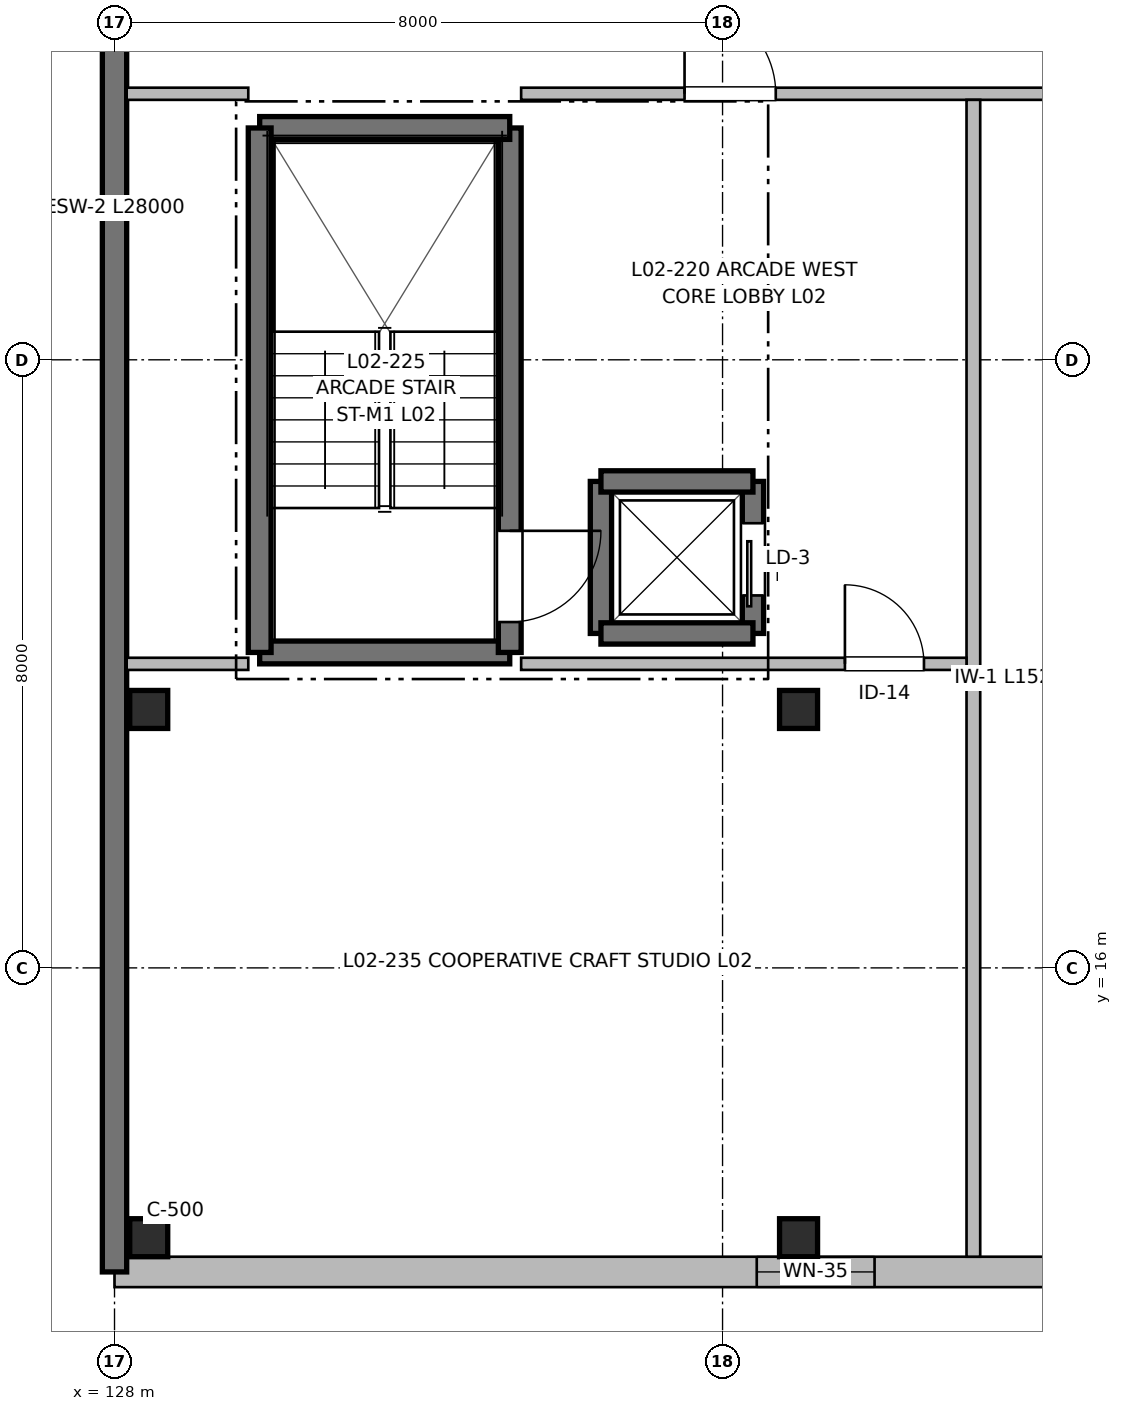
"""IFC4 building model, lengths in metres.
Left out: names, types, materials, properties, quantities, classifications, styles, units other than length and angle.
Written with IfcOpenShell. Run it as: python <this file> out.ifc"""

import sys

from ifc_helpers import new_model, si_unit, direction, frame, frame_2d, origin, origin_2d, place, context, subcontext, project, spatial, rectangle, extrude, element, fill, save


model = new_model("IFC4")
c1 = context("Model", 3, precision=1e-05, world=origin(), true_north=direction((0.0, 1.0)))
c2 = subcontext(c1, "Body", "Model", "MODEL_VIEW")
j1 = project(units=[si_unit("LENGTHUNIT", "METRE"), si_unit("PLANEANGLEUNIT", "RADIAN")], contexts=[c1])
p1 = place(None, origin())
s1 = spatial("IfcSite", under=j1, at=p1, CompositionType="ELEMENT")
p2 = place(p1, origin())
s2 = spatial("IfcBuilding", under=s1, at=p2, CompositionType="ELEMENT")
p3 = place(p2, frame((0.0, 0.0, 7.36)))
s3 = spatial("IfcBuildingStorey", under=s2, at=p3, CompositionType="ELEMENT", Elevation=7.36)
for number, where, z_axis, x_axis in (
    (1, (128.45, 12.45, 0.0), (0.0, 0.0, 1.0), (1.0, 0.0, 0.0)),
    (2, (128.45, 19.4, 0.0), (0.0, 0.0, 1.0), (1.0, 0.0, 0.0)),
    (3, (137.0, 12.45, 0.0), (0.0, 0.0, 1.0), (1.0, 0.0, 0.0)),
    (4, (137.0, 19.4, 0.0), (0.0, 0.0, 1.0), (1.0, 0.0, 0.0)),
):
    element("IfcColumn", number, at=place(p3, frame(where, z_axis=z_axis, x_axis=x_axis)), inside=s3, PredefinedType="COLUMN", context=c2, shape_type="SweptSolid", body=[
        extrude(rectangle(XDim=0.5, YDim=0.5, at=origin_2d()), origin(), (0.0, 0.0, 1.0), 3.2),
    ])
p4 = place(p3, frame((176.0, 12.0, 0.0), z_axis=(0.0, 0.0, 1.0), x_axis=(-1.0, 0.0, 0.0)))
e5 = element("IfcWall", 5, at=p4, inside=s3, PredefinedType="SOLIDWALL", context=c2, shape_type="SweptSolid", body=[
    extrude(rectangle(XDim=48.0, YDim=0.4, at=frame_2d((24.0, 0.0))), origin(), (0.0, 0.0, 1.0), 2.95),
])
p5 = place(p4, frame((5.0, 0.0, 0.62)))
e6 = element("IfcOpeningElement", 6, at=p5, cuts=e5, PredefinedType="OPENING", context=c2, shape_type="SweptSolid", body=[
    extrude(rectangle(XDim=1.75, YDim=1.6, at=frame_2d((0.875, 0.8))), frame((0.0, 0.21, 0.0), z_axis=(0.0, -1.0, 0.0), x_axis=(1.0, 0.0, 0.0)), (0.0, 0.0, 1.0), 0.42),
])
p6 = place(p4, frame((15.45, 0.0, 1.52)))
e7 = element("IfcOpeningElement", 7, at=p6, cuts=e5, PredefinedType="OPENING", context=c2, shape_type="SweptSolid", body=[
    extrude(rectangle(XDim=0.8, YDim=0.7, at=frame_2d((0.4, 0.35))), frame((0.0, 0.21, 0.0), z_axis=(0.0, -1.0, 0.0), x_axis=(1.0, 0.0, 0.0)), (0.0, 0.0, 1.0), 0.42),
])
p7 = place(p4, frame((27.0, 0.0, 1.52)))
e8 = element("IfcOpeningElement", 8, at=p7, cuts=e5, PredefinedType="OPENING", context=c2, shape_type="SweptSolid", body=[
    extrude(rectangle(XDim=0.8, YDim=0.7, at=frame_2d((0.4, 0.35))), frame((0.0, 0.21, 0.0), z_axis=(0.0, -1.0, 0.0), x_axis=(1.0, 0.0, 0.0)), (0.0, 0.0, 1.0), 0.42),
])
p8 = place(p4, frame((38.0, 0.0, 0.45)))
e9 = element("IfcOpeningElement", 9, at=p8, cuts=e5, PredefinedType="OPENING", context=c2, shape_type="SweptSolid", body=[
    extrude(rectangle(XDim=1.55, YDim=1.85, at=frame_2d((0.775, 0.925))), frame((0.0, 0.21, 0.0), z_axis=(0.0, -1.0, 0.0), x_axis=(1.0, 0.0, 0.0)), (0.0, 0.0, 1.0), 0.42),
])
p9 = place(p3, frame((128.0, 12.0, 0.0), z_axis=(0.0, 0.0, 1.0), x_axis=(0.0, 1.0, 0.0)))
e10 = element("IfcWall", 10, at=p9, inside=s3, PredefinedType="SHEAR", context=c2, shape_type="SweptSolid", body=[
    extrude(rectangle(XDim=28.0, YDim=0.32, at=frame_2d((14.0, 0.0))), origin(), (0.0, 0.0, 1.0), 2.95),
])
p10 = place(p3, frame((136.4, 20.4, 0.0), z_axis=(0.0, 0.0, 1.0), x_axis=(0.0, 1.0, 0.0)))
e11 = element("IfcWall", 11, at=p10, inside=s3, PredefinedType="SHEAR", context=c2, shape_type="SweptSolid", body=[
    extrude(rectangle(XDim=2.0, YDim=0.28, at=frame_2d((1.0, 0.0))), origin(), (0.0, 0.0, 1.0), 2.95),
])
p11 = place(p10, frame((0.5, 0.0, 0.0)))
e12 = element("IfcOpeningElement", 12, at=p11, cuts=e11, PredefinedType="OPENING", context=c2, shape_type="SweptSolid", body=[
    extrude(rectangle(XDim=0.95, YDim=2.15, at=frame_2d((0.475, 1.075))), frame((0.0, 0.15, 0.0), z_axis=(0.0, -1.0, 0.0), x_axis=(1.0, 0.0, 0.0)), (0.0, 0.0, 1.0), 0.3),
])
for number, where, z_axis, x_axis in (
    (13, (134.4, 20.4, 0.0), (0.0, 0.0, 1.0), (0.0, 1.0, 0.0)),
    (14, (134.4, 20.4, 0.0), (0.0, 0.0, 1.0), (1.0, 0.0, 0.0)),
    (15, (134.4, 22.4, 0.0), (0.0, 0.0, 1.0), (1.0, 0.0, 0.0)),
):
    element("IfcWall", number, at=place(p3, frame(where, z_axis=z_axis, x_axis=x_axis)), inside=s3, PredefinedType="SHEAR", context=c2, shape_type="SweptSolid", body=[
        extrude(rectangle(XDim=2.0, YDim=0.28, at=frame_2d((1.0, 0.0))), origin(), (0.0, 0.0, 1.0), 2.95),
    ])
p12 = place(p3, frame((133.2, 20.15, 0.0), z_axis=(0.0, 0.0, 1.0), x_axis=(-1.0, 0.0, 0.0)))
e16 = element("IfcWall", 16, at=p12, inside=s3, PredefinedType="SHEAR", context=c2, shape_type="SweptSolid", body=[
    extrude(rectangle(XDim=3.29, YDim=0.3, at=frame_2d((1.645, 0.0))), origin(), (0.0, 0.0, 1.0), 3.2),
])
p13 = place(p3, frame((133.2, 27.05, 0.0), z_axis=(0.0, 0.0, 1.0), x_axis=(0.0, -1.0, 0.0)))
e17 = element("IfcWall", 17, at=p13, inside=s3, PredefinedType="SHEAR", context=c2, shape_type="SweptSolid", body=[
    extrude(rectangle(XDim=6.9, YDim=0.3, at=frame_2d((3.45, 0.0))), origin(), (0.0, 0.0, 1.0), 3.2),
])
p14 = place(p13, frame((5.3, 0.0, 0.0)))
e18 = element("IfcOpeningElement", 18, at=p14, cuts=e17, PredefinedType="OPENING", context=c2, shape_type="SweptSolid", body=[
    extrude(rectangle(XDim=1.2, YDim=2.2, at=frame_2d((0.6, 1.1))), frame((0.0, 0.16, 0.0), z_axis=(0.0, -1.0, 0.0), x_axis=(1.0, 0.0, 0.0)), (0.0, 0.0, 1.0), 0.32),
])
p15 = place(p3, frame((129.91, 27.05, 0.0), z_axis=(0.0, 0.0, 1.0), x_axis=(1.0, 0.0, 0.0)))
e19 = element("IfcWall", 19, at=p15, inside=s3, PredefinedType="SHEAR", context=c2, shape_type="SweptSolid", body=[
    extrude(rectangle(XDim=3.29, YDim=0.3, at=frame_2d((1.645, 0.0))), origin(), (0.0, 0.0, 1.0), 3.2),
])
p16 = place(p3, frame((129.91, 20.15, 0.0), z_axis=(0.0, 0.0, 1.0), x_axis=(0.0, 1.0, 0.0)))
e20 = element("IfcWall", 20, at=p16, inside=s3, PredefinedType="SHEAR", context=c2, shape_type="SweptSolid", body=[
    extrude(rectangle(XDim=6.9, YDim=0.3, at=frame_2d((3.45, 0.0))), origin(), (0.0, 0.0, 1.0), 3.2),
])
p17 = place(p3, frame((128.16, 27.5, 0.0), z_axis=(0.0, 0.0, 1.0), x_axis=(1.0, 0.0, 0.0)))
e21 = element("IfcWall", 21, at=p17, inside=s3, PredefinedType="PARTITIONING", context=c2, shape_type="SweptSolid", body=[
    extrude(rectangle(XDim=1.6, YDim=0.16, at=frame_2d((0.8, 0.0))), origin(), (0.0, 0.0, 1.0), 2.93),
])
p18 = place(p3, frame((133.35, 27.5, 0.0), z_axis=(0.0, 0.0, 1.0), x_axis=(1.0, 0.0, 0.0)))
e22 = element("IfcWall", 22, at=p18, inside=s3, PredefinedType="PARTITIONING", context=c2, shape_type="SweptSolid", body=[
    extrude(rectangle(XDim=36.01, YDim=0.16, at=frame_2d((18.005, 0.0))), origin(), (0.0, 0.0, 1.0), 2.93),
])
p19 = place(p18, frame((2.15, 0.0, 0.0)))
e23 = element("IfcOpeningElement", 23, at=p19, cuts=e22, PredefinedType="OPENING", context=c2, shape_type="SweptSolid", body=[
    extrude(rectangle(XDim=1.2, YDim=2.2, at=frame_2d((0.6, 1.1))), frame((0.0, 0.09, 0.0), z_axis=(0.0, -1.0, 0.0), x_axis=(1.0, 0.0, 0.0)), (0.0, 0.0, 1.0), 0.18),
])
p20 = place(p18, frame((33.45, 0.0, 0.0)))
e24 = element("IfcOpeningElement", 24, at=p20, cuts=e22, PredefinedType="OPENING", context=c2, shape_type="SweptSolid", body=[
    extrude(rectangle(XDim=1.2, YDim=2.2, at=frame_2d((0.6, 1.1))), frame((0.0, 0.09, 0.0), z_axis=(0.0, -1.0, 0.0), x_axis=(1.0, 0.0, 0.0)), (0.0, 0.0, 1.0), 0.18),
])
p21 = place(p18, frame((10.93, 0.0, 0.0)))
e25 = element("IfcOpeningElement", 25, at=p21, cuts=e22, PredefinedType="OPENING", context=c2, shape_type="SweptSolid", body=[
    extrude(rectangle(XDim=0.96, YDim=2.15, at=frame_2d((0.48, 1.075))), frame((0.0, 0.09, 0.0), z_axis=(0.0, -1.0, 0.0), x_axis=(1.0, 0.0, 0.0)), (0.0, 0.0, 1.0), 0.18),
])
p22 = place(p18, frame((20.13, 0.0, 0.0)))
e26 = element("IfcOpeningElement", 26, at=p22, cuts=e22, PredefinedType="OPENING", context=c2, shape_type="SweptSolid", body=[
    extrude(rectangle(XDim=1.5, YDim=2.2, at=frame_2d((0.75, 1.1))), frame((0.0, 0.09, 0.0), z_axis=(0.0, -1.0, 0.0), x_axis=(1.0, 0.0, 0.0)), (0.0, 0.0, 1.0), 0.18),
])
p23 = place(p18, frame((25.53, 0.0, 0.0)))
e27 = element("IfcOpeningElement", 27, at=p23, cuts=e22, PredefinedType="OPENING", context=c2, shape_type="SweptSolid", body=[
    extrude(rectangle(XDim=0.86, YDim=2.1, at=frame_2d((0.43, 1.05))), frame((0.0, 0.09, 0.0), z_axis=(0.0, -1.0, 0.0), x_axis=(1.0, 0.0, 0.0)), (0.0, 0.0, 1.0), 0.18),
])
p24 = place(p18, frame((28.83, 0.0, 0.0)))
e28 = element("IfcOpeningElement", 28, at=p24, cuts=e22, PredefinedType="OPENING", context=c2, shape_type="SweptSolid", body=[
    extrude(rectangle(XDim=0.94, YDim=2.1, at=frame_2d((0.47, 1.05))), frame((0.0, 0.09, 0.0), z_axis=(0.0, -1.0, 0.0), x_axis=(1.0, 0.0, 0.0)), (0.0, 0.0, 1.0), 0.18),
])
p25 = place(p3, frame((139.3, 12.2, 0.0), z_axis=(0.0, 0.0, 1.0), x_axis=(0.0, 1.0, 0.0)))
e29 = element("IfcWall", 29, at=p25, inside=s3, PredefinedType="PARTITIONING", context=c2, shape_type="SweptSolid", body=[
    extrude(rectangle(XDim=15.22, YDim=0.18, at=frame_2d((7.61, 0.0))), origin(), (0.0, 0.0, 1.0), 2.93),
])
p26 = place(p3, frame((128.16, 20.0, 0.0), z_axis=(0.0, 0.0, 1.0), x_axis=(1.0, 0.0, 0.0)))
e30 = element("IfcWall", 30, at=p26, inside=s3, PredefinedType="PARTITIONING", context=c2, shape_type="SweptSolid", body=[
    extrude(rectangle(XDim=1.6, YDim=0.16, at=frame_2d((0.8, 0.0))), origin(), (0.0, 0.0, 1.0), 2.93),
])
p27 = place(p3, frame((133.35, 20.0, 0.0), z_axis=(0.0, 0.0, 1.0), x_axis=(1.0, 0.0, 0.0)))
e31 = element("IfcWall", 31, at=p27, inside=s3, PredefinedType="PARTITIONING", context=c2, shape_type="SweptSolid", body=[
    extrude(rectangle(XDim=5.86, YDim=0.16, at=frame_2d((2.93, 0.0))), origin(), (0.0, 0.0, 1.0), 2.93),
])
p28 = place(p27, frame((4.26, 0.0, 0.0)))
e32 = element("IfcOpeningElement", 32, at=p28, cuts=e31, PredefinedType="OPENING", context=c2, shape_type="SweptSolid", body=[
    extrude(rectangle(XDim=1.04, YDim=2.15, at=frame_2d((0.52, 1.075))), frame((0.0, 0.09, 0.0), z_axis=(0.0, -1.0, 0.0), x_axis=(1.0, 0.0, 0.0)), (0.0, 0.0, 1.0), 0.18),
])
p29 = place(p11, origin())
e33 = element("IfcDoor", 33, at=p29, inside=s3, OperationType="SLIDING_TO_LEFT", PredefinedType="DOOR", context=c2, shape_type="SweptSolid", body=[
    extrude(rectangle(XDim=0.95, YDim=2.15, at=frame_2d((0.475, 1.075))), frame((0.0, 0.025, 0.0), z_axis=(0.0, -1.0, 0.0), x_axis=(1.0, 0.0, 0.0)), (0.0, 0.0, 1.0), 0.05),
])
fill(e12, e33)
p30 = place(p8, origin())
e34 = element("IfcWindow", 34, at=p30, inside=s3, PartitioningType="SINGLE_PANEL", PredefinedType="WINDOW", context=c2, shape_type="SweptSolid", body=[
    extrude(rectangle(XDim=1.55, YDim=1.85, at=frame_2d((0.775, 0.925))), frame((0.0, 0.03, 0.0), z_axis=(0.0, -1.0, 0.0), x_axis=(1.0, 0.0, 0.0)), (0.0, 0.0, 1.0), 0.06),
])
fill(e9, e34)
p31 = place(p14, origin())
e35 = element("IfcDoor", 35, at=p31, inside=s3, OperationType="SINGLE_SWING_LEFT", PredefinedType="DOOR", context=c2, shape_type="SweptSolid", body=[
    extrude(rectangle(XDim=1.2, YDim=2.2, at=frame_2d((0.6, 1.1))), frame((0.0, 0.025, 0.0), z_axis=(0.0, -1.0, 0.0), x_axis=(1.0, 0.0, 0.0)), (0.0, 0.0, 1.0), 0.05),
])
fill(e18, e35)
p32 = place(p19, origin())
e36 = element("IfcDoor", 36, at=p32, inside=s3, OperationType="SINGLE_SWING_LEFT", PredefinedType="DOOR", context=c2, shape_type="SweptSolid", body=[
    extrude(rectangle(XDim=1.2, YDim=2.2, at=frame_2d((0.6, 1.1))), frame((0.0, 0.025, 0.0), z_axis=(0.0, -1.0, 0.0), x_axis=(1.0, 0.0, 0.0)), (0.0, 0.0, 1.0), 0.05),
])
fill(e23, e36)
p33 = place(p28, origin())
e37 = element("IfcDoor", 37, at=p33, inside=s3, OperationType="SINGLE_SWING_LEFT", PredefinedType="DOOR", context=c2, shape_type="SweptSolid", body=[
    extrude(rectangle(XDim=1.04, YDim=2.15, at=frame_2d((0.52, 1.075))), frame((0.0, 0.025, 0.0), z_axis=(0.0, -1.0, 0.0), x_axis=(1.0, 0.0, 0.0)), (0.0, 0.0, 1.0), 0.05),
])
fill(e32, e37)
save(model, sys.argv[1])
